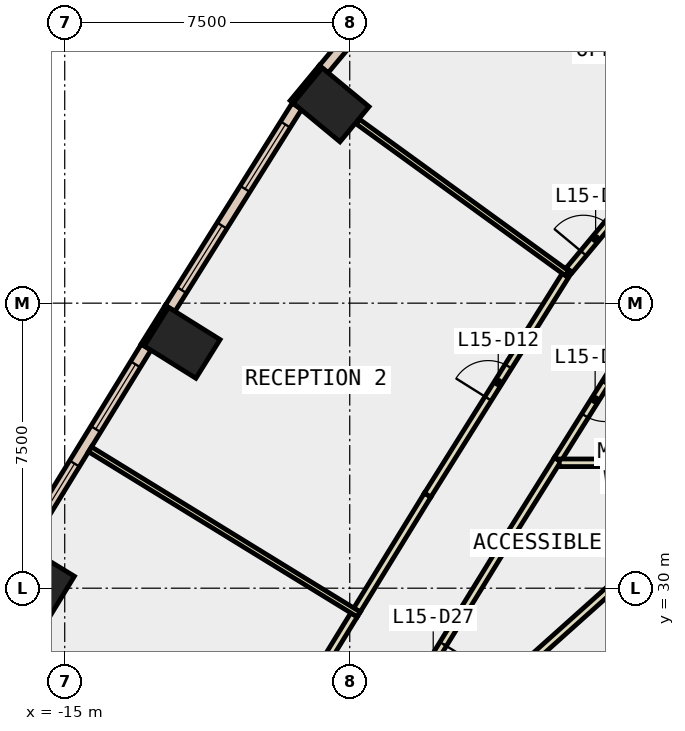
"""IFC4 building model, lengths in metres.
Left out: names, types, materials, properties, quantities, classifications, styles, units other than length and angle.
Written with IfcOpenShell. Run it as: python <this file> out.ifc"""

import sys

from ifc_helpers import new_model, si_unit, direction, frame, frame_2d, origin, origin_2d, place, context, subcontext, project, spatial, rectangle, extrude, element, fill, save


model = new_model("IFC4")
c1 = context("Model", 3, precision=1e-05, world=origin(), true_north=direction((0.0, 1.0)))
c2 = subcontext(c1, "Body", "Model", "MODEL_VIEW")
j1 = project(units=[si_unit("LENGTHUNIT", "METRE"), si_unit("PLANEANGLEUNIT", "RADIAN")], contexts=[c1])
p1 = place(None, origin())
s1 = spatial("IfcSite", under=j1, at=p1, CompositionType="ELEMENT")
p2 = place(p1, origin())
s2 = spatial("IfcBuilding", under=s1, at=p2, CompositionType="ELEMENT")
p3 = place(p2, frame((0.0, 0.0, 72.8)))
s3 = spatial("IfcBuildingStorey", under=s2, at=p3, CompositionType="ELEMENT", Elevation=72.8)
for number, where, z_axis, x_axis in (
    (1, (-7.991, 42.718, -0.4), (0.0, 0.0, 1.0), (0.638, 0.77, 0.0)),
    (2, (-11.909, 36.457, -0.4), (0.0, 0.0, 1.0), (0.53, 0.848, 0.0)),
    (3, (-15.741, 30.219, -0.4), (0.0, 0.0, 1.0), (0.522, 0.853, 0.0)),
):
    element("IfcColumn", number, at=place(p3, frame(where, z_axis=z_axis, x_axis=x_axis)), inside=s3, PredefinedType="COLUMN", context=c2, shape_type="SweptSolid", body=[
        extrude(rectangle(XDim=1.2, YDim=1.6, at=origin_2d()), origin(), (0.0, 0.0, 1.0), 4.2),
    ])
for number, where, z_axis, x_axis in (
    (4, (-8.263, 43.722, 0.0), (0.0, 0.0, 1.0), (-0.638, -0.77, 0.0)),
    (5, (-12.312, 37.416, 0.0), (0.0, 0.0, 1.0), (-0.53, -0.848, 0.0)),
):
    element("IfcWall", number, at=place(p3, frame(where, z_axis=z_axis, x_axis=x_axis)), inside=s3, PredefinedType="STANDARD", context=c2, shape_type="SweptSolid", body=[
        extrude(rectangle(XDim=1.199, YDim=0.1, at=frame_2d((0.6, 0.0))), origin(), (0.0, 0.0, 1.0), 3.8),
    ])
p4 = place(p3, frame((-5.681, 46.658, 0.0), z_axis=(0.0, 0.0, 1.0), x_axis=(-0.640565172846, -0.767903808649, 0.0)))
e6 = element("IfcWall", 6, at=p4, inside=s3, PredefinedType="STANDARD", context=c2, shape_type="SweptSolid", body=[
    extrude(rectangle(XDim=3.909, YDim=0.3, at=frame_2d((1.955, 0.0))), origin(), (0.0, 0.0, 1.0), 3.8),
])
p5 = place(p4, frame((1.255, 0.0, 0.9)))
e7 = element("IfcOpeningElement", 7, at=p5, cuts=e6, PredefinedType="OPENING", context=c2, shape_type="SweptSolid", body=[
    extrude(rectangle(XDim=1.4, YDim=2.6, at=frame_2d((0.7, 1.3))), frame((0.0, 0.16, 0.0), z_axis=(0.0, -1.0, 0.0), x_axis=(1.0, 0.0, 0.0)), (0.0, 0.0, 1.0), 0.32),
])
p6 = place(p3, frame((-8.889, 42.684, 0.0), z_axis=(0.0, 0.0, 1.0), x_axis=(-0.531357111884, -0.847147932565, 0.0)))
e8 = element("IfcWall", 8, at=p6, inside=s3, PredefinedType="STANDARD", context=c2, shape_type="SweptSolid", body=[
    extrude(rectangle(XDim=6.282, YDim=0.3, at=frame_2d((3.141, 0.0))), origin(), (0.0, 0.0, 1.0), 3.8),
])
p7 = place(p6, frame((0.571, 0.0, 0.9)))
e9 = element("IfcOpeningElement", 9, at=p7, cuts=e8, PredefinedType="OPENING", context=c2, shape_type="SweptSolid", body=[
    extrude(rectangle(XDim=2.0, YDim=2.6, at=frame_2d((1.0, 1.3))), frame((0.0, 0.16, 0.0), z_axis=(0.0, -1.0, 0.0), x_axis=(1.0, 0.0, 0.0)), (0.0, 0.0, 1.0), 0.32),
])
p8 = place(p6, frame((3.712, 0.0, 0.9)))
e10 = element("IfcOpeningElement", 10, at=p8, cuts=e8, PredefinedType="OPENING", context=c2, shape_type="SweptSolid", body=[
    extrude(rectangle(XDim=2.0, YDim=2.6, at=frame_2d((1.0, 1.3))), frame((0.0, 0.16, 0.0), z_axis=(0.0, -1.0, 0.0), x_axis=(1.0, 0.0, 0.0)), (0.0, 0.0, 1.0), 0.32),
])
p9 = place(p3, frame((-12.858, 36.344, 0.0), z_axis=(0.0, 0.0, 1.0), x_axis=(-0.523421823151, -0.852073702827, 0.0)))
e11 = element("IfcWall", 11, at=p9, inside=s3, PredefinedType="STANDARD", context=c2, shape_type="SweptSolid", body=[
    extrude(rectangle(XDim=6.131, YDim=0.3, at=frame_2d((3.065, 0.0))), origin(), (0.0, 0.0, 1.0), 3.8),
])
p10 = place(p9, frame((0.533, 0.0, 0.9)))
e12 = element("IfcOpeningElement", 12, at=p10, cuts=e11, PredefinedType="OPENING", context=c2, shape_type="SweptSolid", body=[
    extrude(rectangle(XDim=2.0, YDim=2.6, at=frame_2d((1.0, 1.3))), frame((0.0, 0.16, 0.0), z_axis=(0.0, -1.0, 0.0), x_axis=(1.0, 0.0, 0.0)), (0.0, 0.0, 1.0), 0.32),
])
p11 = place(p9, frame((3.598, 0.0, 0.9)))
e13 = element("IfcOpeningElement", 13, at=p11, cuts=e11, PredefinedType="OPENING", context=c2, shape_type="SweptSolid", body=[
    extrude(rectangle(XDim=2.0, YDim=2.6, at=frame_2d((1.0, 1.3))), frame((0.0, 0.16, 0.0), z_axis=(0.0, -1.0, 0.0), x_axis=(1.0, 0.0, 0.0)), (0.0, 0.0, 1.0), 0.32),
])
p12 = place(p3, frame((-2.031, 33.385, 0.0), z_axis=(0.0, 0.0, 1.0), x_axis=(-0.531358798686, -0.84714687455, 0.0)))
e14 = element("IfcWall", 14, at=p12, inside=s3, PredefinedType="PARTITIONING", context=c2, shape_type="SweptSolid", body=[
    extrude(rectangle(XDim=2.597, YDim=0.2, at=frame_2d((1.298, 0.0))), origin(), (0.0, 0.0, 1.0), 3.8),
])
p13 = place(p3, frame((-3.411, 31.185, 0.0), z_axis=(0.0, 0.0, 1.0), x_axis=(-0.523464329994, -0.852047589765, 0.0)))
e15 = element("IfcWall", 15, at=p13, inside=s3, PredefinedType="PARTITIONING", context=c2, shape_type="SweptSolid", body=[
    extrude(rectangle(XDim=7.231, YDim=0.2, at=frame_2d((3.615, 0.0))), origin(), (0.0, 0.0, 1.0), 3.8),
])
p14 = place(p13, frame((3.115, 0.0, 0.0)))
e16 = element("IfcOpeningElement", 16, at=p14, cuts=e15, PredefinedType="OPENING", context=c2, shape_type="SweptSolid", body=[
    extrude(rectangle(XDim=1.0, YDim=2.1, at=frame_2d((0.5, 1.05))), frame((0.0, 0.11, 0.0), z_axis=(0.0, -1.0, 0.0), x_axis=(1.0, 0.0, 0.0)), (0.0, 0.0, 1.0), 0.22),
])
p15 = place(p3, frame((0.053, 36.708, 0.0), z_axis=(0.0, 0.0, 1.0), x_axis=(-0.53130190932, -0.847182554797, 0.0)))
e17 = element("IfcWall", 17, at=p15, inside=s3, PredefinedType="PARTITIONING", context=c2, shape_type="SweptSolid", body=[
    extrude(rectangle(XDim=3.922, YDim=0.2, at=frame_2d((1.961, 0.0))), origin(), (0.0, 0.0, 1.0), 3.8),
])
p16 = place(p15, frame((1.562, 0.0, 0.0)))
e18 = element("IfcOpeningElement", 18, at=p16, cuts=e17, PredefinedType="OPENING", context=c2, shape_type="SweptSolid", body=[
    extrude(rectangle(XDim=1.0, YDim=2.1, at=frame_2d((0.5, 1.05))), frame((0.0, 0.11, 0.0), z_axis=(0.0, -1.0, 0.0), x_axis=(1.0, 0.0, 0.0)), (0.0, 0.0, 1.0), 0.22),
])
p17 = place(p3, frame((-1.724, 38.365, 0.0), z_axis=(0.0, 0.0, 1.0), x_axis=(0.64036162185, 0.768073559799, 0.0)))
e19 = element("IfcWall", 19, at=p17, inside=s3, PredefinedType="PARTITIONING", context=c2, shape_type="SweptSolid", body=[
    extrude(rectangle(XDim=2.168, YDim=0.2, at=frame_2d((1.084, 0.0))), origin(), (0.0, 0.0, 1.0), 3.8),
])
p18 = place(p17, frame((0.584, 0.0, 0.0)))
e20 = element("IfcOpeningElement", 20, at=p18, cuts=e19, PredefinedType="OPENING", context=c2, shape_type="SweptSolid", body=[
    extrude(rectangle(XDim=1.0, YDim=2.1, at=frame_2d((0.5, 1.05))), frame((0.0, 0.11, 0.0), z_axis=(0.0, -1.0, 0.0), x_axis=(1.0, 0.0, 0.0)), (0.0, 0.0, 1.0), 0.22),
])
p19 = place(p3, frame((-7.309, 29.426, 0.0), z_axis=(0.0, 0.0, 1.0), x_axis=(0.523617783711, 0.851953294836, 0.0)))
e21 = element("IfcWall", 21, at=p19, inside=s3, PredefinedType="PARTITIONING", context=c2, shape_type="SweptSolid", body=[
    extrude(rectangle(XDim=3.551, YDim=0.2, at=frame_2d((1.775, 0.0))), origin(), (0.0, 0.0, 1.0), 3.8),
])
p20 = place(p3, frame((-5.45, 32.451, 0.0), z_axis=(0.0, 0.0, 1.0), x_axis=(0.531388870359, 0.847128011849, 0.0)))
e22 = element("IfcWall", 22, at=p20, inside=s3, PredefinedType="PARTITIONING", context=c2, shape_type="SweptSolid", body=[
    extrude(rectangle(XDim=6.991, YDim=0.2, at=frame_2d((3.495, 0.0))), origin(), (0.0, 0.0, 1.0), 3.8),
])
p21 = place(p20, frame((2.996, 0.0, 0.0)))
e23 = element("IfcOpeningElement", 23, at=p21, cuts=e22, PredefinedType="OPENING", context=c2, shape_type="SweptSolid", body=[
    extrude(rectangle(XDim=1.0, YDim=2.1, at=frame_2d((0.5, 1.05))), frame((0.0, 0.11, 0.0), z_axis=(0.0, -1.0, 0.0), x_axis=(1.0, 0.0, 0.0)), (0.0, 0.0, 1.0), 0.22),
])
p22 = place(p3, frame((-9.246, 26.271, 0.0), z_axis=(0.0, 0.0, 1.0), x_axis=(0.523341833043, 0.852122834917, 0.0)))
e24 = element("IfcWall", 24, at=p22, inside=s3, PredefinedType="PARTITIONING", context=c2, shape_type="SweptSolid", body=[
    extrude(rectangle(XDim=3.552, YDim=0.2, at=frame_2d((1.776, 0.0))), origin(), (0.0, 0.0, 1.0), 3.8),
])
p23 = place(p3, frame((-7.065, 24.233, 0.0), z_axis=(0.0, 0.0, 1.0), x_axis=(0.745362618546, 0.666659258448, 0.0)))
e25 = element("IfcWall", 25, at=p23, inside=s3, PredefinedType="PARTITIONING", context=c2, shape_type="SweptSolid", body=[
    extrude(rectangle(XDim=9.579, YDim=0.2, at=frame_2d((4.79, 0.0))), origin(), (0.0, 0.0, 1.0), 3.8),
])
p24 = place(p3, frame((-1.985, 33.3, 0.0), z_axis=(0.0, 0.0, 1.0), x_axis=(1.0, 0.0, 0.0)))
e26 = element("IfcWall", 26, at=p24, inside=s3, PredefinedType="PARTITIONING", context=c2, shape_type="SweptSolid", body=[
    extrude(rectangle(XDim=1.885, YDim=0.2, at=frame_2d((0.942, 0.0))), origin(), (0.0, 0.0, 1.0), 3.8),
])
p25 = place(p3, frame((-1.788, 38.289, 0.0), z_axis=(0.0, 0.0, 1.0), x_axis=(-0.809417495555, 0.587233614408, 0.0)))
e27 = element("IfcWall", 27, at=p25, inside=s3, PredefinedType="PARTITIONING", context=c2, shape_type="SweptSolid", body=[
    extrude(rectangle(XDim=6.796, YDim=0.15, at=frame_2d((3.398, 0.0))), origin(), (0.0, 0.0, 1.0), 3.8),
])
p26 = place(p3, frame((-7.263, 29.31, 0.0), z_axis=(0.0, 0.0, 1.0), x_axis=(-0.85208929269, 0.523396443706, 0.0)))
e28 = element("IfcWall", 28, at=p26, inside=s3, PredefinedType="PARTITIONING", context=c2, shape_type="SweptSolid", body=[
    extrude(rectangle(XDim=8.3, YDim=0.15, at=frame_2d((4.15, 0.0))), origin(), (0.0, 0.0, 1.0), 3.8),
])
p27 = place(p7, origin())
e29 = element("IfcWindow", 29, at=p27, inside=s3, PartitioningType="SINGLE_PANEL", PredefinedType="WINDOW", context=c2, shape_type="SweptSolid", body=[
    extrude(rectangle(XDim=2.0, YDim=2.6, at=frame_2d((1.0, 1.3))), frame((0.0, 0.03, 0.0), z_axis=(0.0, -1.0, 0.0), x_axis=(1.0, 0.0, 0.0)), (0.0, 0.0, 1.0), 0.06),
])
fill(e9, e29)
p28 = place(p8, origin())
e30 = element("IfcWindow", 30, at=p28, inside=s3, PartitioningType="SINGLE_PANEL", PredefinedType="WINDOW", context=c2, shape_type="SweptSolid", body=[
    extrude(rectangle(XDim=2.0, YDim=2.6, at=frame_2d((1.0, 1.3))), frame((0.0, 0.03, 0.0), z_axis=(0.0, -1.0, 0.0), x_axis=(1.0, 0.0, 0.0)), (0.0, 0.0, 1.0), 0.06),
])
fill(e10, e30)
p29 = place(p10, origin())
e31 = element("IfcWindow", 31, at=p29, inside=s3, PartitioningType="SINGLE_PANEL", PredefinedType="WINDOW", context=c2, shape_type="SweptSolid", body=[
    extrude(rectangle(XDim=2.0, YDim=2.6, at=frame_2d((1.0, 1.3))), frame((0.0, 0.03, 0.0), z_axis=(0.0, -1.0, 0.0), x_axis=(1.0, 0.0, 0.0)), (0.0, 0.0, 1.0), 0.06),
])
fill(e12, e31)
p30 = place(p11, origin())
e32 = element("IfcWindow", 32, at=p30, inside=s3, PartitioningType="SINGLE_PANEL", PredefinedType="WINDOW", context=c2, shape_type="SweptSolid", body=[
    extrude(rectangle(XDim=2.0, YDim=2.6, at=frame_2d((1.0, 1.3))), frame((0.0, 0.03, 0.0), z_axis=(0.0, -1.0, 0.0), x_axis=(1.0, 0.0, 0.0)), (0.0, 0.0, 1.0), 0.06),
])
fill(e13, e32)
p31 = place(p18, origin())
e33 = element("IfcDoor", 33, at=p31, inside=s3, OperationType="SINGLE_SWING_LEFT", PredefinedType="DOOR", context=c2, shape_type="SweptSolid", body=[
    extrude(rectangle(XDim=1.0, YDim=2.1, at=frame_2d((0.5, 1.05))), frame((0.0, 0.025, 0.0), z_axis=(0.0, -1.0, 0.0), x_axis=(1.0, 0.0, 0.0)), (0.0, 0.0, 1.0), 0.05),
])
fill(e20, e33)
p32 = place(p21, origin())
e34 = element("IfcDoor", 34, at=p32, inside=s3, OperationType="SINGLE_SWING_LEFT", PredefinedType="DOOR", context=c2, shape_type="SweptSolid", body=[
    extrude(rectangle(XDim=1.0, YDim=2.1, at=frame_2d((0.5, 1.05))), frame((0.0, 0.025, 0.0), z_axis=(0.0, -1.0, 0.0), x_axis=(1.0, 0.0, 0.0)), (0.0, 0.0, 1.0), 0.05),
])
fill(e23, e34)
p33 = place(p14, origin())
e35 = element("IfcDoor", 35, at=p33, inside=s3, OperationType="SINGLE_SWING_LEFT", PredefinedType="DOOR", context=c2, shape_type="SweptSolid", body=[
    extrude(rectangle(XDim=1.0, YDim=2.1, at=frame_2d((0.5, 1.05))), frame((0.0, 0.025, 0.0), z_axis=(0.0, -1.0, 0.0), x_axis=(1.0, 0.0, 0.0)), (0.0, 0.0, 1.0), 0.05),
])
fill(e16, e35)
p34 = place(p16, origin())
e36 = element("IfcDoor", 36, at=p34, inside=s3, OperationType="SINGLE_SWING_LEFT", PredefinedType="DOOR", context=c2, shape_type="SweptSolid", body=[
    extrude(rectangle(XDim=1.0, YDim=2.1, at=frame_2d((0.5, 1.05))), frame((0.0, 0.025, 0.0), z_axis=(0.0, -1.0, 0.0), x_axis=(1.0, 0.0, 0.0)), (0.0, 0.0, 1.0), 0.05),
])
fill(e18, e36)
save(model, sys.argv[1])
